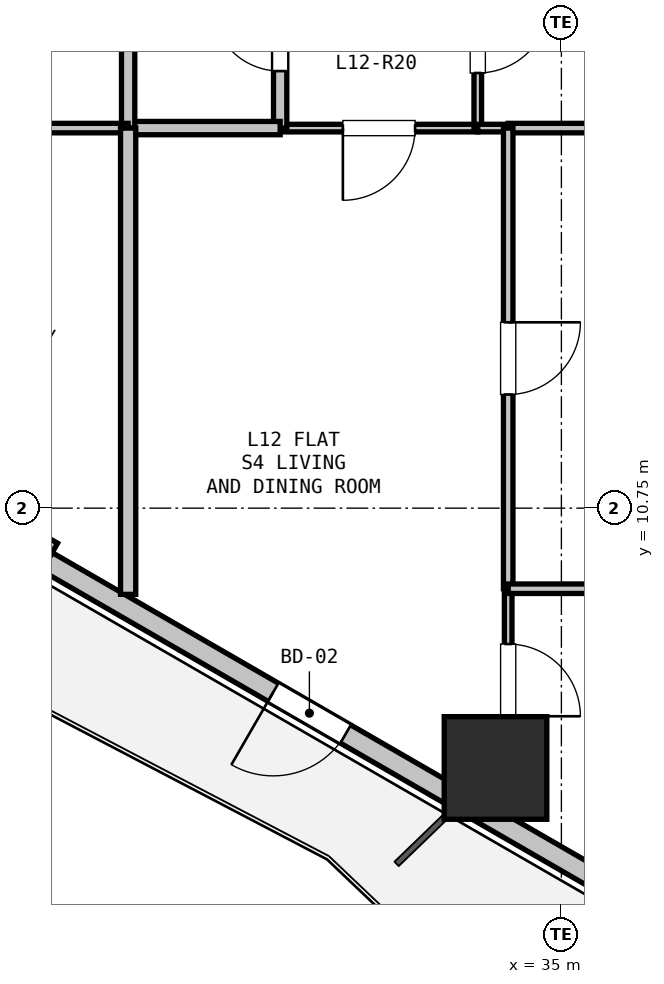
"""IFC4 building model, lengths in metres.
Left out: names, types, materials, properties, quantities, classifications, styles, units other than length and angle.
Written with IfcOpenShell. Run it as: python <this file> out.ifc"""

import sys

from ifc_helpers import new_model, si_unit, direction, frame, frame_2d, origin, origin_2d, place, context, subcontext, project, spatial, rectangle, hollow_rectangle, extrude, element, fill, save


model = new_model("IFC4")
c1 = context("Model", 3, precision=1e-05, world=origin(), true_north=direction((0.0, 1.0)))
c2 = subcontext(c1, "Body", "Model", "MODEL_VIEW")
j1 = project(units=[si_unit("LENGTHUNIT", "METRE"), si_unit("PLANEANGLEUNIT", "RADIAN")], contexts=[c1])
p1 = place(None, origin())
s1 = spatial("IfcSite", under=j1, at=p1, CompositionType="ELEMENT")
p2 = place(p1, origin())
s2 = spatial("IfcBuilding", under=s1, at=p2, CompositionType="ELEMENT")
p3 = place(p2, frame((0.0, 0.0, 45.6)))
s3 = spatial("IfcBuildingStorey", under=s2, at=p3, CompositionType="ELEMENT", Elevation=45.6)
p4 = place(p3, frame((34.133, 7.332, 0.0), z_axis=(0.0, 0.0, 1.0), x_axis=(1.0, 0.0, 0.0)))
e1 = element("IfcColumn", 1, at=p4, inside=s3, PredefinedType="COLUMN", context=c2, shape_type="SweptSolid", body=[
    extrude(hollow_rectangle(XDim=1.35, YDim=1.35, WallThickness=0.036, at=origin_2d()), origin(), (0.0, 0.0, 1.0), 3.3),
])
p5 = place(p3, frame((39.207, 3.71, 0.0), z_axis=(0.0, 0.0, 1.0), x_axis=(-0.86603192154, 0.499988710747, 0.0)))
e2 = element("IfcWall", 2, at=p5, inside=s3, PredefinedType="SOLIDWALL", context=c2, shape_type="SweptSolid", body=[
    extrude(rectangle(XDim=12.673, YDim=0.275, at=frame_2d((6.336, 0.0))), origin(), (0.0, 0.0, 1.0), 2.66),
])
p6 = place(p5, frame((8.136, 0.0, 0.0)))
e3 = element("IfcOpeningElement", 3, at=p6, cuts=e2, PredefinedType="OPENING", context=c2, shape_type="SweptSolid", body=[
    extrude(rectangle(XDim=1.1, YDim=2.1, at=frame_2d((0.55, 1.05))), frame((0.0, 0.147, 0.0), z_axis=(0.0, -1.0, 0.0), x_axis=(1.0, 0.0, 0.0)), (0.0, 0.0, 1.0), 0.295),
])
p7 = place(p5, frame((2.518, 0.0, 0.9)))
e4 = element("IfcOpeningElement", 4, at=p7, cuts=e2, PredefinedType="OPENING", context=c2, shape_type="SweptSolid", body=[
    extrude(rectangle(XDim=1.2, YDim=1.4, at=frame_2d((0.6, 0.7))), frame((0.0, 0.147, 0.0), z_axis=(0.0, -1.0, 0.0), x_axis=(1.0, 0.0, 0.0)), (0.0, 0.0, 1.0), 0.295),
])
p8 = place(p3, frame((28.322, 10.202, 0.0), z_axis=(0.0, 0.0, 1.0), x_axis=(-0.86605165483, 0.499954529098, 0.0)))
e5 = element("IfcWall", 5, at=p8, inside=s3, PredefinedType="PARAPET", context=c2, shape_type="SweptSolid", body=[
    extrude(rectangle(XDim=1.7, YDim=0.2, at=frame_2d((0.85, 0.0))), origin(), (0.0, 0.0, 1.0), 2.66),
])
p9 = place(p3, frame((33.9, 15.75, 0.0), z_axis=(0.0, 0.0, 1.0), x_axis=(-1.0, 0.0, 0.0)))
e6 = element("IfcWall", 6, at=p9, inside=s3, PredefinedType="PARTITIONING", context=c2, shape_type="SweptSolid", body=[
    extrude(rectangle(XDim=2.6, YDim=0.1, at=frame_2d((1.3, 0.0))), origin(), (0.0, 0.0, 1.0), 3.04),
])
p10 = place(p9, frame((0.825, 0.0, 0.0)))
e7 = element("IfcOpeningElement", 7, at=p10, cuts=e6, PredefinedType="OPENING", context=c2, shape_type="SweptSolid", body=[
    extrude(rectangle(XDim=0.95, YDim=2.1, at=frame_2d((0.475, 1.05))), frame((0.0, 0.06, 0.0), z_axis=(0.0, -1.0, 0.0), x_axis=(1.0, 0.0, 0.0)), (0.0, 0.0, 1.0), 0.12),
])
p11 = place(p3, frame((31.3, 15.75, 0.0), z_axis=(0.0, 0.0, 1.0), x_axis=(0.0, 1.0, 0.0)))
e8 = element("IfcWall", 8, at=p11, inside=s3, PredefinedType="PLUMBINGWALL", context=c2, shape_type="SweptSolid", body=[
    extrude(rectangle(XDim=2.4, YDim=0.175, at=frame_2d((1.2, 0.0))), origin(), (0.0, 0.0, 1.0), 3.04),
])
p12 = place(p11, frame((0.75, 0.0, 0.0)))
e9 = element("IfcOpeningElement", 9, at=p12, cuts=e8, PredefinedType="OPENING", context=c2, shape_type="SweptSolid", body=[
    extrude(rectangle(XDim=0.9, YDim=2.1, at=frame_2d((0.45, 1.05))), frame((0.0, 0.097, 0.0), z_axis=(0.0, -1.0, 0.0), x_axis=(1.0, 0.0, 0.0)), (0.0, 0.0, 1.0), 0.195),
])
p13 = place(p3, frame((33.9, 18.15, 0.0), z_axis=(0.0, 0.0, 1.0), x_axis=(0.0, -1.0, 0.0)))
e10 = element("IfcWall", 10, at=p13, inside=s3, PredefinedType="PARTITIONING", context=c2, shape_type="SweptSolid", body=[
    extrude(rectangle(XDim=2.4, YDim=0.1, at=frame_2d((1.2, 0.0))), origin(), (0.0, 0.0, 1.0), 3.04),
])
p14 = place(p13, frame((0.725, 0.0, 0.0)))
e11 = element("IfcOpeningElement", 11, at=p14, cuts=e10, PredefinedType="OPENING", context=c2, shape_type="SweptSolid", body=[
    extrude(rectangle(XDim=0.95, YDim=2.1, at=frame_2d((0.475, 1.05))), frame((0.0, 0.06, 0.0), z_axis=(0.0, -1.0, 0.0), x_axis=(1.0, 0.0, 0.0)), (0.0, 0.0, 1.0), 0.12),
])
p15 = place(p3, frame((31.3, 15.75, 0.0), z_axis=(0.0, 0.0, 1.0), x_axis=(-1.0, 0.0, 0.0)))
e12 = element("IfcWall", 12, at=p15, inside=s3, PredefinedType="PLUMBINGWALL", context=c2, shape_type="SweptSolid", body=[
    extrude(rectangle(XDim=2.0, YDim=0.175, at=frame_2d((1.0, 0.0))), origin(), (0.0, 0.0, 1.0), 3.04),
])
p16 = place(p3, frame((29.3, 15.75, 0.0), z_axis=(0.0, 0.0, 1.0), x_axis=(0.0, 1.0, 0.0)))
e13 = element("IfcWall", 13, at=p16, inside=s3, PredefinedType="PLUMBINGWALL", context=c2, shape_type="SweptSolid", body=[
    extrude(rectangle(XDim=2.4, YDim=0.175, at=frame_2d((1.2, 0.0))), origin(), (0.0, 0.0, 1.0), 3.04),
])
p17 = place(p3, frame((43.688, 15.75, 0.0), z_axis=(0.0, 0.0, 1.0), x_axis=(-1.0, 0.0, 0.0)))
e14 = element("IfcWall", 14, at=p17, inside=s3, PredefinedType="PARTITIONING", context=c2, shape_type="SweptSolid", body=[
    extrude(rectangle(XDim=9.388, YDim=0.125, at=frame_2d((4.694, 0.0))), origin(), (0.0, 0.0, 1.0), 2.337),
])
p18 = place(p17, frame((4.219, 0.0, 0.0)))
e15 = element("IfcOpeningElement", 15, at=p18, cuts=e14, PredefinedType="OPENING", context=c2, shape_type="SweptSolid", body=[
    extrude(rectangle(XDim=0.95, YDim=2.1, at=frame_2d((0.475, 1.05))), frame((0.0, 0.073, 0.0), z_axis=(0.0, -1.0, 0.0), x_axis=(1.0, 0.0, 0.0)), (0.0, 0.0, 1.0), 0.145),
])
p19 = place(p3, frame((34.3, 15.75, 0.0), z_axis=(0.0, 0.0, 1.0), x_axis=(-1.0, 0.0, 0.0)))
e16 = element("IfcWall", 16, at=p19, inside=s3, PredefinedType="PARTITIONING", context=c2, shape_type="SweptSolid", body=[
    extrude(rectangle(XDim=0.4, YDim=0.1, at=frame_2d((0.2, 0.0))), origin(), (0.0, 0.0, 1.0), 3.04),
])
p20 = place(p3, frame((27.1, 15.75, 0.0), z_axis=(0.0, 0.0, 1.0), x_axis=(1.0, 0.0, 0.0)))
e17 = element("IfcWall", 17, at=p20, inside=s3, PredefinedType="PARTITIONING", context=c2, shape_type="SweptSolid", body=[
    extrude(rectangle(XDim=2.2, YDim=0.125, at=frame_2d((1.1, 0.0))), origin(), (0.0, 0.0, 1.0), 3.04),
])
p21 = place(p3, frame((29.3, 15.75, 0.0), z_axis=(0.0, 0.0, 1.0), x_axis=(0.0, -1.0, 0.0)))
e18 = element("IfcWall", 18, at=p21, inside=s3, PredefinedType="PARTITIONING", context=c2, shape_type="SweptSolid", body=[
    extrude(rectangle(XDim=6.134, YDim=0.2, at=frame_2d((3.067, 0.0))), origin(), (0.0, 0.0, 1.0), 2.337),
])
p22 = place(p3, frame((34.3, 15.75, 0.0), z_axis=(0.0, 0.0, 1.0), x_axis=(0.0, -1.0, 0.0)))
e19 = element("IfcWall", 19, at=p22, inside=s3, PredefinedType="PARTITIONING", context=c2, shape_type="SweptSolid", body=[
    extrude(rectangle(XDim=6.06, YDim=0.125, at=frame_2d((3.03, 0.0))), origin(), (0.0, 0.0, 1.0), 3.04),
])
p23 = place(p22, frame((2.555, 0.0, 0.0)))
e20 = element("IfcOpeningElement", 20, at=p23, cuts=e19, PredefinedType="OPENING", context=c2, shape_type="SweptSolid", body=[
    extrude(rectangle(XDim=0.95, YDim=2.1, at=frame_2d((0.475, 1.05))), frame((0.0, 0.073, 0.0), z_axis=(0.0, -1.0, 0.0), x_axis=(1.0, 0.0, 0.0)), (0.0, 0.0, 1.0), 0.145),
])
p24 = place(p3, frame((34.3, 9.69, 0.0), z_axis=(0.0, 0.0, 1.0), x_axis=(0.0, -1.0, 0.0)))
e21 = element("IfcWall", 21, at=p24, inside=s3, PredefinedType="PARTITIONING", context=c2, shape_type="SweptSolid", body=[
    extrude(rectangle(XDim=2.961, YDim=0.1, at=frame_2d((1.48, 0.0))), origin(), (0.0, 0.0, 1.0), 3.04),
])
p25 = place(p24, frame((0.728, 0.0, 0.0)))
e22 = element("IfcOpeningElement", 22, at=p25, cuts=e21, PredefinedType="OPENING", context=c2, shape_type="SweptSolid", body=[
    extrude(rectangle(XDim=0.95, YDim=2.1, at=frame_2d((0.475, 1.05))), frame((0.0, 0.06, 0.0), z_axis=(0.0, -1.0, 0.0), x_axis=(1.0, 0.0, 0.0)), (0.0, 0.0, 1.0), 0.12),
])
p26 = place(p3, frame((34.3, 9.69, 0.0), z_axis=(0.0, 0.0, 1.0), x_axis=(1.0, 0.0, 0.0)))
e23 = element("IfcWall", 23, at=p26, inside=s3, PredefinedType="PARTITIONING", context=c2, shape_type="SweptSolid", body=[
    extrude(rectangle(XDim=4.78, YDim=0.125, at=frame_2d((2.39, 0.0))), origin(), (0.0, 0.0, 1.0), 3.04),
])
p27 = place(p26, frame((1.915, 0.0, 0.0)))
e24 = element("IfcOpeningElement", 24, at=p27, cuts=e23, PredefinedType="OPENING", context=c2, shape_type="SweptSolid", body=[
    extrude(rectangle(XDim=0.95, YDim=2.1, at=frame_2d((0.475, 1.05))), frame((0.0, 0.073, 0.0), z_axis=(0.0, -1.0, 0.0), x_axis=(1.0, 0.0, 0.0)), (0.0, 0.0, 1.0), 0.145),
])
p28 = place(p6, origin())
e25 = element("IfcDoor", 25, at=p28, inside=s3, OperationType="SINGLE_SWING_RIGHT", PredefinedType="DOOR", context=c2, shape_type="SweptSolid", body=[
    extrude(rectangle(XDim=1.1, YDim=2.1, at=frame_2d((0.55, 1.05))), frame((0.0, 0.025, 0.0), z_axis=(0.0, -1.0, 0.0), x_axis=(1.0, 0.0, 0.0)), (0.0, 0.0, 1.0), 0.05),
])
fill(e3, e25)
p29 = place(p12, origin())
e26 = element("IfcDoor", 26, at=p29, inside=s3, OperationType="SINGLE_SWING_RIGHT", PredefinedType="DOOR", context=c2, shape_type="SweptSolid", body=[
    extrude(rectangle(XDim=0.9, YDim=2.1, at=frame_2d((0.45, 1.05))), frame((0.0, 0.025, 0.0), z_axis=(0.0, -1.0, 0.0), x_axis=(1.0, 0.0, 0.0)), (0.0, 0.0, 1.0), 0.05),
])
fill(e9, e26)
p30 = place(p14, origin())
e27 = element("IfcDoor", 27, at=p30, inside=s3, OperationType="SINGLE_SWING_LEFT", PredefinedType="DOOR", context=c2, shape_type="SweptSolid", body=[
    extrude(rectangle(XDim=0.95, YDim=2.1, at=frame_2d((0.475, 1.05))), frame((0.0, 0.025, 0.0), z_axis=(0.0, -1.0, 0.0), x_axis=(1.0, 0.0, 0.0)), (0.0, 0.0, 1.0), 0.05),
])
fill(e11, e27)
p31 = place(p10, origin())
e28 = element("IfcDoor", 28, at=p31, inside=s3, OperationType="SINGLE_SWING_RIGHT", PredefinedType="DOOR", context=c2, shape_type="SweptSolid", body=[
    extrude(rectangle(XDim=0.95, YDim=2.1, at=frame_2d((0.475, 1.05))), frame((0.0, 0.025, 0.0), z_axis=(0.0, -1.0, 0.0), x_axis=(1.0, 0.0, 0.0)), (0.0, 0.0, 1.0), 0.05),
])
fill(e7, e28)
p32 = place(p25, origin())
e29 = element("IfcDoor", 29, at=p32, inside=s3, OperationType="SINGLE_SWING_RIGHT", PredefinedType="DOOR", context=c2, shape_type="SweptSolid", body=[
    extrude(rectangle(XDim=0.95, YDim=2.1, at=frame_2d((0.475, 1.05))), frame((0.0, 0.025, 0.0), z_axis=(0.0, -1.0, 0.0), x_axis=(1.0, 0.0, 0.0)), (0.0, 0.0, 1.0), 0.05),
])
fill(e22, e29)
p33 = place(p23, origin())
e30 = element("IfcDoor", 30, at=p33, inside=s3, OperationType="SINGLE_SWING_LEFT", PredefinedType="DOOR", context=c2, shape_type="SweptSolid", body=[
    extrude(rectangle(XDim=0.95, YDim=2.1, at=frame_2d((0.475, 1.05))), frame((0.0, 0.025, 0.0), z_axis=(0.0, -1.0, 0.0), x_axis=(1.0, 0.0, 0.0)), (0.0, 0.0, 1.0), 0.05),
])
fill(e20, e30)
save(model, sys.argv[1])
